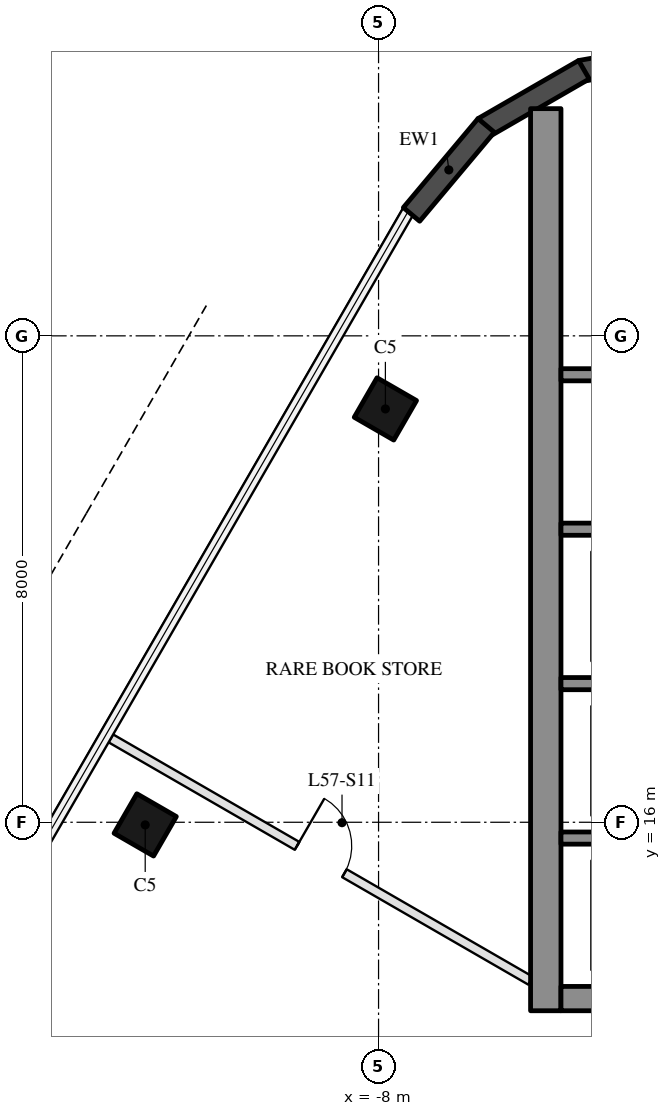
"""IFC4 building model, lengths in metres.
Left out: names, types, materials, properties, quantities, classifications, styles, units other than length and angle.
Written with IfcOpenShell. Run it as: python <this file> out.ifc"""

import sys

from ifc_helpers import new_model, si_unit, direction, frame, frame_2d, origin, origin_2d, place, context, subcontext, project, spatial, rectangle, hollow_rectangle, extrude, element, fill, save


model = new_model("IFC4")
c1 = context("Model", 3, precision=1e-05, world=origin(), true_north=direction((0.0, 1.0)))
c2 = subcontext(c1, "Body", "Model", "MODEL_VIEW")
j1 = project(units=[si_unit("LENGTHUNIT", "METRE"), si_unit("PLANEANGLEUNIT", "RADIAN")], contexts=[c1])
p1 = place(None, origin())
s1 = spatial("IfcSite", under=j1, at=p1, CompositionType="ELEMENT")
p2 = place(p1, origin())
s2 = spatial("IfcBuilding", under=s1, at=p2, CompositionType="ELEMENT")
p3 = place(p2, frame((0.0, 0.0, 231.7)))
s3 = spatial("IfcBuildingStorey", under=s2, at=p3, CompositionType="ELEMENT", Elevation=231.7)
for number, where, z_axis, x_axis in (
    (1, (-7.888, 22.798, 0.0), (0.0, 0.0, 1.0), (0.5, 0.866, 0.0)),
    (2, (-11.838, 15.957, 0.0), (0.0, 0.0, 1.0), (0.5, 0.866, 0.0)),
):
    element("IfcColumn", number, at=place(p3, frame(where, z_axis=z_axis, x_axis=x_axis)), inside=s3, PredefinedType="COLUMN", context=c2, shape_type="SweptSolid", body=[
        extrude(hollow_rectangle(XDim=0.75, YDim=0.75, WallThickness=0.035, at=origin_2d()), origin(), (0.0, 0.0, 1.0), 6.0),
    ])
for number, where, z_axis, x_axis in (
    (3, (-2.799, 28.688, 0.0), (0.0, 0.0, 1.0), (-0.985, -0.174, 0.0)),
    (4, (-4.623, 28.377, 0.0), (0.0, 0.0, 1.0), (-0.866, -0.5, 0.0)),
):
    element("IfcWall", number, at=place(p3, frame(where, z_axis=z_axis, x_axis=x_axis)), inside=s3, PredefinedType="SOLIDWALL", context=c2, shape_type="SweptSolid", body=[
        extrude(rectangle(XDim=1.91, YDim=0.35, at=frame_2d((0.955, 0.0))), origin(), (0.0, 0.0, 1.0), 5.7),
    ])
p4 = place(p3, frame((-6.23, 27.461, 0.0), z_axis=(0.0, 0.0, 1.0), x_axis=(-0.642808304945, -0.766027077259, 0.0)))
e5 = element("IfcWall", 5, at=p4, inside=s3, PredefinedType="SOLIDWALL", context=c2, shape_type="SweptSolid", body=[
    extrude(rectangle(XDim=1.91, YDim=0.35, at=frame_2d((0.955, 0.0))), origin(), (0.0, 0.0, 1.0), 5.7),
])
p5 = place(p3, frame((-5.25, 12.9, 0.0), z_axis=(0.0, 0.0, 1.0), x_axis=(0.0, 1.0, 0.0)))
e6 = element("IfcWall", 6, at=p5, inside=s3, PredefinedType="SHEAR", context=c2, shape_type="SweptSolid", body=[
    extrude(rectangle(XDim=14.837, YDim=0.5, at=frame_2d((7.418, 0.0))), origin(), (0.0, 0.0, 1.0), 5.7),
])
for number, where, z_axis, x_axis in (
    (7, (-3.0, 15.74, 0.0), (0.0, 0.0, 1.0), (-1.0, 0.0, 0.0)),
    (8, (-3.0, 18.28, 0.0), (0.0, 0.0, 1.0), (-1.0, 0.0, 0.0)),
    (9, (-3.0, 20.82, 0.0), (0.0, 0.0, 1.0), (-1.0, 0.0, 0.0)),
    (10, (-3.0, 23.36, 0.0), (0.0, 0.0, 1.0), (-1.0, 0.0, 0.0)),
):
    element("IfcWall", number, at=place(p3, frame(where, z_axis=z_axis, x_axis=x_axis)), inside=s3, PredefinedType="SHEAR", context=c2, shape_type="SweptSolid", body=[
        extrude(rectangle(XDim=2.0, YDim=0.2, at=frame_2d((1.0, 0.0))), origin(), (0.0, 0.0, 1.0), 5.7),
    ])
p6 = place(p3, frame((2.45, 13.1, 0.0), z_axis=(0.0, 0.0, 1.0), x_axis=(-1.0, 0.0, 0.0)))
e11 = element("IfcWall", 11, at=p6, inside=s3, PredefinedType="SHEAR", context=c2, shape_type="SweptSolid", body=[
    extrude(rectangle(XDim=7.45, YDim=0.4, at=frame_2d((3.725, 0.0))), origin(), (0.0, 0.0, 1.0), 5.7),
])
p7 = place(p6, frame((1.0, 0.0, 0.0)))
e12 = element("IfcOpeningElement", 12, at=p7, cuts=e11, PredefinedType="OPENING", context=c2, shape_type="SweptSolid", body=[
    extrude(rectangle(XDim=1.1, YDim=2.1, at=frame_2d((0.55, 1.05))), frame((0.0, 0.21, 0.0), z_axis=(0.0, -1.0, 0.0), x_axis=(1.0, 0.0, 0.0)), (0.0, 0.0, 1.0), 0.42),
])
p8 = place(p6, frame((3.3, 0.0, 0.0)))
e13 = element("IfcOpeningElement", 13, at=p8, cuts=e11, PredefinedType="OPENING", context=c2, shape_type="SweptSolid", body=[
    extrude(rectangle(XDim=1.4, YDim=2.1, at=frame_2d((0.7, 1.05))), frame((0.0, 0.21, 0.0), z_axis=(0.0, -1.0, 0.0), x_axis=(1.0, 0.0, 0.0)), (0.0, 0.0, 1.0), 0.42),
])
p9 = place(p3, frame((-12.402, 17.379, 0.0), z_axis=(0.0, 0.0, 1.0), x_axis=(0.866021319631, -0.500007073895, 0.0)))
e14 = element("IfcWall", 14, at=p9, inside=s3, PredefinedType="PARTITIONING", context=c2, shape_type="SweptSolid", body=[
    extrude(rectangle(XDim=7.97, YDim=0.15, at=frame_2d((3.985, 0.0))), origin(), (0.0, 0.0, 1.0), 5.7),
])
p10 = place(p9, frame((3.535, 0.0, 0.0)))
e15 = element("IfcOpeningElement", 15, at=p10, cuts=e14, PredefinedType="OPENING", context=c2, shape_type="SweptSolid", body=[
    extrude(rectangle(XDim=0.9, YDim=2.1, at=frame_2d((0.45, 1.05))), frame((0.0, 0.085, 0.0), z_axis=(0.0, -1.0, 0.0), x_axis=(1.0, 0.0, 0.0)), (0.0, 0.0, 1.0), 0.17),
])
p11 = place(p3, frame((-15.077, 12.746, 0.0), z_axis=(0.0, 0.0, 1.0), x_axis=(0.866026447599, -0.499998192055, 0.0)))
e16 = element("IfcWall", 16, at=p11, inside=s3, PredefinedType="PARTITIONING", context=c2, shape_type="SweptSolid", body=[
    extrude(rectangle(XDim=10.73, YDim=0.15, at=frame_2d((5.365, 0.0))), origin(), (0.0, 0.0, 1.0), 5.7),
])
p12 = place(p3, frame((-2.482, 12.9, 0.0), z_axis=(0.0, 0.0, 1.0), x_axis=(-0.50000478328, -0.866022642139, 0.0)))
e17 = element("IfcWall", 17, at=p12, inside=s3, PredefinedType="PARTITIONING", context=c2, shape_type="SweptSolid", body=[
    extrude(rectangle(XDim=19.861, YDim=0.2, at=frame_2d((9.931, 0.0))), origin(), (0.0, 0.0, 1.0), 4.91),
])
p13 = place(p12, frame((2.968, 0.0, 0.0)))
e18 = element("IfcOpeningElement", 18, at=p13, cuts=e17, PredefinedType="OPENING", context=c2, shape_type="SweptSolid", body=[
    extrude(rectangle(XDim=1.5, YDim=2.1, at=frame_2d((0.75, 1.05))), frame((0.0, 0.11, 0.0), z_axis=(0.0, -1.0, 0.0), x_axis=(1.0, 0.0, 0.0)), (0.0, 0.0, 1.0), 0.22),
])
p14 = place(p12, frame((15.968, 0.0, 0.0)))
e19 = element("IfcOpeningElement", 19, at=p14, cuts=e17, PredefinedType="OPENING", context=c2, shape_type="SweptSolid", body=[
    extrude(rectangle(XDim=1.0, YDim=2.1, at=frame_2d((0.5, 1.05))), frame((0.0, 0.11, 0.0), z_axis=(0.0, -1.0, 0.0), x_axis=(1.0, 0.0, 0.0)), (0.0, 0.0, 1.0), 0.22),
])
p15 = place(p12, frame((9.43, 0.0, 0.0)))
e20 = element("IfcOpeningElement", 20, at=p15, cuts=e17, PredefinedType="OPENING", context=c2, shape_type="SweptSolid", body=[
    extrude(rectangle(XDim=1.0, YDim=2.1, at=frame_2d((0.5, 1.05))), frame((0.0, 0.11, 0.0), z_axis=(0.0, -1.0, 0.0), x_axis=(1.0, 0.0, 0.0)), (0.0, 0.0, 1.0), 0.22),
])
p16 = place(p10, origin())
e21 = element("IfcDoor", 21, at=p16, inside=s3, OperationType="SINGLE_SWING_LEFT", PredefinedType="DOOR", context=c2, shape_type="SweptSolid", body=[
    extrude(rectangle(XDim=0.9, YDim=2.1, at=frame_2d((0.45, 1.05))), frame((0.0, 0.025, 0.0), z_axis=(0.0, -1.0, 0.0), x_axis=(1.0, 0.0, 0.0)), (0.0, 0.0, 1.0), 0.05),
])
fill(e15, e21)
save(model, sys.argv[1])
